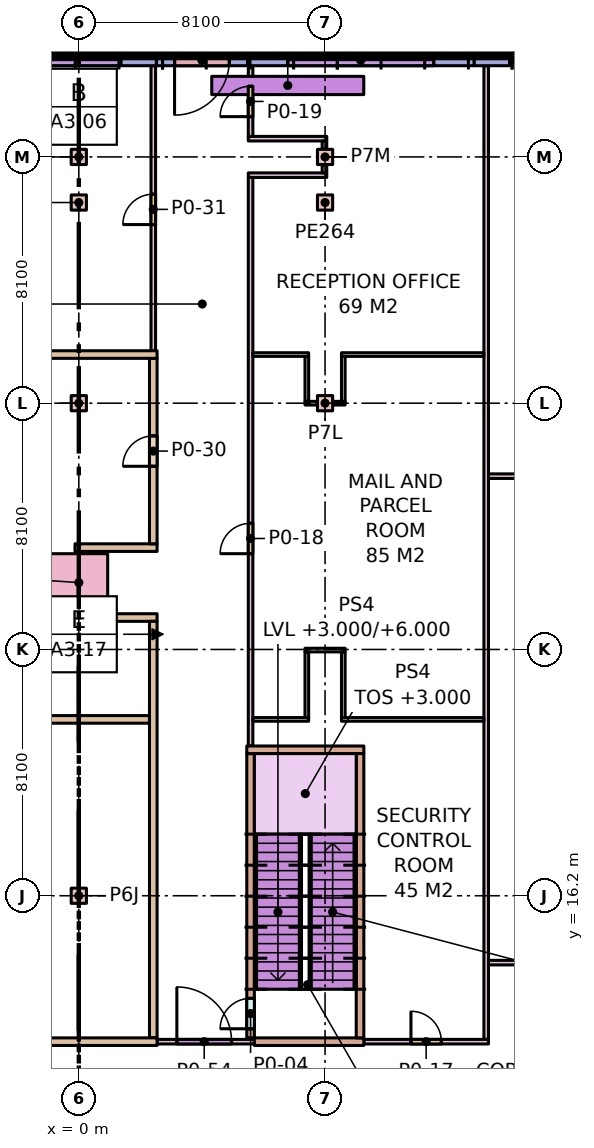
"""IFC4 building model, lengths in metres.
Left out: names, types, materials, properties, quantities, classifications, styles, units other than length and angle.
Written with IfcOpenShell. Run it as: python <this file> out.ifc"""

import sys

from ifc_helpers import new_model, si_unit, direction, frame, frame_2d, origin, origin_2d, place, context, subcontext, project, spatial, rectangle, extrude, element, fill, save


model = new_model("IFC4")
c1 = context("Model", 3, precision=1e-05, world=origin(), true_north=direction((0.0, 1.0)))
c2 = subcontext(c1, "Body", "Model", "MODEL_VIEW")
j1 = project(units=[si_unit("LENGTHUNIT", "METRE"), si_unit("PLANEANGLEUNIT", "RADIAN")], contexts=[c1])
p1 = place(None, origin())
s1 = spatial("IfcSite", under=j1, at=p1, CompositionType="ELEMENT")
p2 = place(p1, origin())
s2 = spatial("IfcBuilding", under=s1, at=p2, CompositionType="ELEMENT")
p3 = place(p2, origin())
s3 = spatial("IfcBuildingStorey", under=s2, at=p3, CompositionType="ELEMENT", Elevation=0.0)
for number, where, z_axis, x_axis in (
    (1, (0.0, 16.2, 0.0), (0.0, 0.0, 1.0), (1.0, 0.0, 0.0)),
    (2, (0.0, 32.4, 0.0), (0.0, 0.0, 1.0), (1.0, 0.0, 0.0)),
    (3, (0.0, 40.5, 0.0), (0.0, 0.0, 1.0), (1.0, 0.0, 0.0)),
    (4, (8.1, 32.4, 0.0), (0.0, 0.0, 1.0), (1.0, 0.0, 0.0)),
    (5, (8.1, 40.5, 0.0), (0.0, 0.0, 1.0), (1.0, 0.0, 0.0)),
    (6, (8.1, 39.0, 0.0), (0.0, 0.0, 1.0), (1.0, 0.0, 0.0)),
    (7, (0.0, 39.0, 0.0), (0.0, 0.0, 1.0), (1.0, 0.0, 0.0)),
):
    element("IfcColumn", number, at=place(p3, frame(where, z_axis=z_axis, x_axis=x_axis)), inside=s3, PredefinedType="COLUMN", context=c2, shape_type="SweptSolid", body=[
        extrude(rectangle(XDim=0.5, YDim=0.5, at=origin_2d()), origin(), (0.0, 0.0, 1.0), 6.0),
    ])
p4 = place(p3, frame((0.0, 26.5, 0.0), z_axis=(0.0, 0.0, 1.0), x_axis=(-1.0, 0.0, 0.0)))
e8 = element("IfcColumn", 8, at=p4, inside=s3, PredefinedType="COLUMN", context=c2, shape_type="SweptSolid", body=[
    extrude(rectangle(XDim=1.9, YDim=1.9, at=origin_2d()), origin(), (0.0, 0.0, 1.0), 6.0),
])
p5 = place(p3, frame((14.167, 43.675, 0.0), z_axis=(0.0, 0.0, 1.0), x_axis=(-1.0, 0.0, 0.0)))
e9 = element("IfcWall", 9, at=p5, inside=s3, PredefinedType="STANDARD", context=c2, shape_type="SweptSolid", body=[
    extrude(rectangle(XDim=1.167, YDim=0.35, at=frame_2d((0.583, 0.0))), origin(), (0.0, 0.0, 1.0), 5.68),
])
p6 = place(p3, frame((13.0, 43.675, 0.0), z_axis=(0.0, 0.0, 1.0), x_axis=(-1.0, 0.0, 0.0)))
e10 = element("IfcWall", 10, at=p6, inside=s3, PredefinedType="STANDARD", context=c2, shape_type="SweptSolid", body=[
    extrude(rectangle(XDim=7.45, YDim=0.35, at=frame_2d((3.725, 0.0))), origin(), (0.0, 0.0, 1.0), 5.68),
])
p7 = place(p6, frame((1.325, 0.0, 0.3)))
e11 = element("IfcOpeningElement", 11, at=p7, cuts=e10, PredefinedType="OPENING", context=c2, shape_type="SweptSolid", body=[
    extrude(rectangle(XDim=4.8, YDim=4.5, at=frame_2d((2.4, 2.25))), frame((0.0, 0.185, 0.0), z_axis=(0.0, -1.0, 0.0), x_axis=(1.0, 0.0, 0.0)), (0.0, 0.0, 1.0), 0.37),
])
p8 = place(p3, frame((5.55, 43.675, 0.0), z_axis=(0.0, 0.0, 1.0), x_axis=(-1.0, 0.0, 0.0)))
e12 = element("IfcWall", 12, at=p8, inside=s3, PredefinedType="STANDARD", context=c2, shape_type="SweptSolid", body=[
    extrude(rectangle(XDim=3.0, YDim=0.35, at=frame_2d((1.5, 0.0))), origin(), (0.0, 0.0, 1.0), 5.68),
])
p9 = place(p8, frame((0.6, 0.0, 0.0)))
e13 = element("IfcOpeningElement", 13, at=p9, cuts=e12, PredefinedType="OPENING", context=c2, shape_type="SweptSolid", body=[
    extrude(rectangle(XDim=1.8, YDim=2.4, at=frame_2d((0.9, 1.2))), frame((0.0, 0.185, 0.0), z_axis=(0.0, -1.0, 0.0), x_axis=(1.0, 0.0, 0.0)), (0.0, 0.0, 1.0), 0.37),
])
p10 = place(p3, frame((2.55, 43.675, 0.0), z_axis=(0.0, 0.0, 1.0), x_axis=(-1.0, 0.0, 0.0)))
e14 = element("IfcWall", 14, at=p10, inside=s3, PredefinedType="STANDARD", context=c2, shape_type="SweptSolid", body=[
    extrude(rectangle(XDim=7.134, YDim=0.35, at=frame_2d((3.567, 0.0))), origin(), (0.0, 0.0, 1.0), 5.68),
])
p11 = place(p10, frame((1.167, 0.0, 0.3)))
e15 = element("IfcOpeningElement", 15, at=p11, cuts=e14, PredefinedType="OPENING", context=c2, shape_type="SweptSolid", body=[
    extrude(rectangle(XDim=4.8, YDim=4.5, at=frame_2d((2.4, 2.25))), frame((0.0, 0.185, 0.0), z_axis=(0.0, -1.0, 0.0), x_axis=(1.0, 0.0, 0.0)), (0.0, 0.0, 1.0), 0.37),
])
p12 = place(p3, frame((9.373, 42.85, 6.0), z_axis=(0.0, 0.0, 1.0), x_axis=(-1.0, 0.0, 0.0)))
e16 = element("IfcWall", 16, at=p12, inside=s3, PredefinedType="PARAPET", context=c2, shape_type="SweptSolid", body=[
    extrude(rectangle(XDim=5.0, YDim=0.6, at=frame_2d((2.5, 0.0))), origin(), (0.0, 0.0, 1.0), 0.9),
])
p13 = place(p3, frame((-17.713, 22.0, 0.0), z_axis=(0.0, 0.0, 1.0), x_axis=(1.0, 0.0, 0.0)))
e17 = element("IfcWall", 17, at=p13, inside=s3, PredefinedType="PARTITIONING", context=c2, shape_type="SweptSolid", body=[
    extrude(rectangle(XDim=20.038, YDim=0.25, at=frame_2d((10.019, 0.0))), origin(), (0.0, 0.0, 1.0), 5.68),
])
for number, where, z_axis, x_axis in (
    (18, (-0.125, 25.35, 0.0), (0.0, 0.0, 1.0), (1.0, 0.0, 0.0)),
    (19, (-0.125, 27.65, 0.0), (0.0, 0.0, 1.0), (1.0, 0.0, 0.0)),
):
    element("IfcWall", number, at=place(p3, frame(where, z_axis=z_axis, x_axis=x_axis)), inside=s3, PredefinedType="PARTITIONING", context=c2, shape_type="SweptSolid", body=[
        extrude(rectangle(XDim=2.7, YDim=0.25, at=frame_2d((1.35, 0.0))), origin(), (0.0, 0.0, 1.0), 5.68),
    ])
p14 = place(p3, frame((2.45, 27.775, 0.0), z_axis=(0.0, 0.0, 1.0), x_axis=(0.0, 1.0, 0.0)))
e20 = element("IfcWall", 20, at=p14, inside=s3, PredefinedType="PARTITIONING", context=c2, shape_type="SweptSolid", body=[
    extrude(rectangle(XDim=6.1, YDim=0.25, at=frame_2d((3.05, 0.0))), origin(), (0.0, 0.0, 1.0), 5.68),
])
p15 = place(p14, frame((2.55, 0.0, 0.0)))
e21 = element("IfcOpeningElement", 21, at=p15, cuts=e20, PredefinedType="OPENING", context=c2, shape_type="SweptSolid", body=[
    extrude(rectangle(XDim=1.0, YDim=2.1, at=frame_2d((0.5, 1.05))), frame((0.0, 0.135, 0.0), z_axis=(0.0, -1.0, 0.0), x_axis=(1.0, 0.0, 0.0)), (0.0, 0.0, 1.0), 0.27),
])
p16 = place(p3, frame((-24.125, 34.0, 0.0), z_axis=(0.0, 0.0, 1.0), x_axis=(1.0, 0.0, 0.0)))
e22 = element("IfcWall", 22, at=p16, inside=s3, PredefinedType="PARTITIONING", context=c2, shape_type="SweptSolid", body=[
    extrude(rectangle(XDim=26.7, YDim=0.25, at=frame_2d((13.35, 0.0))), origin(), (0.0, 0.0, 1.0), 5.68),
])
p17 = place(p3, frame((2.45, 11.525, 0.0), z_axis=(0.0, 0.0, 1.0), x_axis=(0.0, 1.0, 0.0)))
e23 = element("IfcWall", 23, at=p17, inside=s3, PredefinedType="PARTITIONING", context=c2, shape_type="SweptSolid", body=[
    extrude(rectangle(XDim=13.7, YDim=0.25, at=frame_2d((6.85, 0.0))), origin(), (0.0, 0.0, 1.0), 5.68),
])
p18 = place(p3, frame((-13.275, 11.4, 0.0), z_axis=(0.0, 0.0, 1.0), x_axis=(1.0, 0.0, 0.0)))
e24 = element("IfcWall", 24, at=p18, inside=s3, PredefinedType="PARTITIONING", context=c2, shape_type="SweptSolid", body=[
    extrude(rectangle(XDim=15.85, YDim=0.25, at=frame_2d((7.925, 0.0))), origin(), (0.0, 0.0, 1.0), 5.68),
])
p19 = place(p18, frame((7.45, 0.0, 0.0)))
e25 = element("IfcOpeningElement", 25, at=p19, cuts=e24, PredefinedType="OPENING", context=c2, shape_type="SweptSolid", body=[
    extrude(rectangle(XDim=1.0, YDim=2.1, at=frame_2d((0.5, 1.05))), frame((0.0, 0.135, 0.0), z_axis=(0.0, -1.0, 0.0), x_axis=(1.0, 0.0, 0.0)), (0.0, 0.0, 1.0), 0.27),
])
p20 = place(p3, frame((13.475, 14.0, 0.0), z_axis=(0.0, 0.0, 1.0), x_axis=(1.0, 0.0, 0.0)))
e26 = element("IfcWall", 26, at=p20, inside=s3, PredefinedType="PARTITIONING", context=c2, shape_type="SweptSolid", body=[
    extrude(rectangle(XDim=38.6, YDim=0.15, at=frame_2d((19.3, 0.0))), origin(), (0.0, 0.0, 1.0), 5.68),
])
p21 = place(p20, frame((22.875, 0.0, 0.0)))
e27 = element("IfcOpeningElement", 27, at=p21, cuts=e26, PredefinedType="OPENING", context=c2, shape_type="SweptSolid", body=[
    extrude(rectangle(XDim=1.8, YDim=2.4, at=frame_2d((0.9, 1.2))), frame((0.0, 0.085, 0.0), z_axis=(0.0, -1.0, 0.0), x_axis=(1.0, 0.0, 0.0)), (0.0, 0.0, 1.0), 0.17),
])
p22 = place(p3, frame((13.475, 30.0, 0.0), z_axis=(0.0, 0.0, 1.0), x_axis=(1.0, 0.0, 0.0)))
e28 = element("IfcWall", 28, at=p22, inside=s3, PredefinedType="PARTITIONING", context=c2, shape_type="SweptSolid", body=[
    extrude(rectangle(XDim=38.6, YDim=0.15, at=frame_2d((19.3, 0.0))), origin(), (0.0, 0.0, 1.0), 5.68),
])
p23 = place(p22, frame((18.35, 0.0, 0.0)))
e29 = element("IfcOpeningElement", 29, at=p23, cuts=e28, PredefinedType="OPENING", context=c2, shape_type="SweptSolid", body=[
    extrude(rectangle(XDim=1.8, YDim=2.4, at=frame_2d((0.9, 1.2))), frame((0.0, 0.085, 0.0), z_axis=(0.0, -1.0, 0.0), x_axis=(1.0, 0.0, 0.0)), (0.0, 0.0, 1.0), 0.17),
])
p24 = place(p3, frame((13.4, 11.475, 0.0), z_axis=(0.0, 0.0, 1.0), x_axis=(0.0, 1.0, 0.0)))
e30 = element("IfcWall", 30, at=p24, inside=s3, PredefinedType="PARTITIONING", context=c2, shape_type="SweptSolid", body=[
    extrude(rectangle(XDim=32.025, YDim=0.15, at=frame_2d((16.012, 0.0))), origin(), (0.0, 0.0, 1.0), 5.68),
])
p25 = place(p3, frame((7.44, 32.4, 0.0), z_axis=(0.0, 0.0, 1.0), x_axis=(1.0, 0.0, 0.0)))
e31 = element("IfcWall", 31, at=p25, inside=s3, PredefinedType="PARTITIONING", context=c2, shape_type="SweptSolid", body=[
    extrude(rectangle(XDim=0.4, YDim=0.12, at=frame_2d((0.2, 0.0))), origin(), (0.0, 0.0, 1.0), 5.68),
])
p26 = place(p3, frame((8.36, 32.4, 0.0), z_axis=(0.0, 0.0, 1.0), x_axis=(1.0, 0.0, 0.0)))
e32 = element("IfcWall", 32, at=p26, inside=s3, PredefinedType="PARTITIONING", context=c2, shape_type="SweptSolid", body=[
    extrude(rectangle(XDim=0.4, YDim=0.12, at=frame_2d((0.2, 0.0))), origin(), (0.0, 0.0, 1.0), 5.68),
])
p27 = place(p3, frame((5.725, 34.0, 0.0), z_axis=(0.0, 0.0, 1.0), x_axis=(1.0, 0.0, 0.0)))
e33 = element("IfcWall", 33, at=p27, inside=s3, PredefinedType="PARTITIONING", context=c2, shape_type="SweptSolid", body=[
    extrude(rectangle(XDim=1.835, YDim=0.12, at=frame_2d((0.917, 0.0))), origin(), (0.0, 0.0, 1.0), 5.68),
])
p28 = place(p3, frame((8.64, 34.0, 0.0), z_axis=(0.0, 0.0, 1.0), x_axis=(1.0, 0.0, 0.0)))
e34 = element("IfcWall", 34, at=p28, inside=s3, PredefinedType="PARTITIONING", context=c2, shape_type="SweptSolid", body=[
    extrude(rectangle(XDim=4.685, YDim=0.12, at=frame_2d((2.343, 0.0))), origin(), (0.0, 0.0, 1.0), 5.68),
])
for number, where, z_axis, x_axis in (
    (35, (7.5, 32.46, 0.0), (0.0, 0.0, 1.0), (0.0, 1.0, 0.0)),
    (36, (8.7, 32.46, 0.0), (0.0, 0.0, 1.0), (0.0, 1.0, 0.0)),
):
    element("IfcWall", number, at=place(p3, frame(where, z_axis=z_axis, x_axis=x_axis)), inside=s3, PredefinedType="PARTITIONING", context=c2, shape_type="SweptSolid", body=[
        extrude(rectangle(XDim=1.48, YDim=0.12, at=frame_2d((0.74, 0.0))), origin(), (0.0, 0.0, 1.0), 5.68),
    ])
p29 = place(p3, frame((5.725, 22.0, 0.0), z_axis=(0.0, 0.0, 1.0), x_axis=(1.0, 0.0, 0.0)))
e37 = element("IfcWall", 37, at=p29, inside=s3, PredefinedType="PARTITIONING", context=c2, shape_type="SweptSolid", body=[
    extrude(rectangle(XDim=1.835, YDim=0.12, at=frame_2d((0.917, 0.0))), origin(), (0.0, 0.0, 1.0), 5.68),
])
p30 = place(p3, frame((8.64, 22.0, 0.0), z_axis=(0.0, 0.0, 1.0), x_axis=(1.0, 0.0, 0.0)))
e38 = element("IfcWall", 38, at=p30, inside=s3, PredefinedType="PARTITIONING", context=c2, shape_type="SweptSolid", body=[
    extrude(rectangle(XDim=4.685, YDim=0.12, at=frame_2d((2.343, 0.0))), origin(), (0.0, 0.0, 1.0), 5.68),
])
p31 = place(p3, frame((7.44, 24.28, 0.0), z_axis=(0.0, 0.0, 1.0), x_axis=(1.0, 0.0, 0.0)))
e39 = element("IfcWall", 39, at=p31, inside=s3, PredefinedType="PARTITIONING", context=c2, shape_type="SweptSolid", body=[
    extrude(rectangle(XDim=1.32, YDim=0.12, at=frame_2d((0.66, 0.0))), origin(), (0.0, 0.0, 1.0), 5.68),
])
for number, where, z_axis, x_axis in (
    (40, (7.5, 22.06, 0.0), (0.0, 0.0, 1.0), (0.0, 1.0, 0.0)),
    (41, (8.7, 22.06, 0.0), (0.0, 0.0, 1.0), (0.0, 1.0, 0.0)),
):
    element("IfcWall", number, at=place(p3, frame(where, z_axis=z_axis, x_axis=x_axis)), inside=s3, PredefinedType="PARTITIONING", context=c2, shape_type="SweptSolid", body=[
        extrude(rectangle(XDim=2.16, YDim=0.12, at=frame_2d((1.08, 0.0))), origin(), (0.0, 0.0, 1.0), 5.68),
    ])
p32 = place(p3, frame((5.65, 11.525, 0.0), z_axis=(0.0, 0.0, 1.0), x_axis=(0.0, 1.0, 0.0)))
e42 = element("IfcWall", 42, at=p32, inside=s3, PredefinedType="STANDARD", context=c2, shape_type="SweptSolid", body=[
    extrude(rectangle(XDim=9.35, YDim=0.25, at=frame_2d((4.675, 0.0))), origin(), (0.0, 0.0, 1.0), 5.68),
])
p33 = place(p32, frame((0.3, 0.0, 0.0)))
e43 = element("IfcOpeningElement", 43, at=p33, cuts=e42, PredefinedType="OPENING", context=c2, shape_type="SweptSolid", body=[
    extrude(rectangle(XDim=1.0, YDim=2.1, at=frame_2d((0.5, 1.05))), frame((0.0, 0.135, 0.0), z_axis=(0.0, -1.0, 0.0), x_axis=(1.0, 0.0, 0.0)), (0.0, 0.0, 1.0), 0.27),
])
for number, where, z_axis, x_axis in (
    (44, (5.575, 39.9, 0.0), (0.0, 0.0, 1.0), (1.0, 0.0, 0.0)),
    (45, (5.575, 41.1, 0.0), (0.0, 0.0, 1.0), (1.0, 0.0, 0.0)),
):
    element("IfcWall", number, at=place(p3, frame(where, z_axis=z_axis, x_axis=x_axis)), inside=s3, PredefinedType="PARTITIONING", context=c2, shape_type="SweptSolid", body=[
        extrude(rectangle(XDim=2.58, YDim=0.15, at=frame_2d((1.29, 0.0))), origin(), (0.0, 0.0, 1.0), 5.68),
    ])
p34 = place(p3, frame((5.65, 41.175, 0.0), z_axis=(0.0, 0.0, 1.0), x_axis=(0.0, 1.0, 0.0)))
e46 = element("IfcWall", 46, at=p34, inside=s3, PredefinedType="PARTITIONING", context=c2, shape_type="SweptSolid", body=[
    extrude(rectangle(XDim=2.325, YDim=0.15, at=frame_2d((1.163, 0.0))), origin(), (0.0, 0.0, 1.0), 5.68),
])
p35 = place(p34, frame((0.65, 0.0, 0.0)))
e47 = element("IfcOpeningElement", 47, at=p35, cuts=e46, PredefinedType="OPENING", context=c2, shape_type="SweptSolid", body=[
    extrude(rectangle(XDim=1.0, YDim=2.1, at=frame_2d((0.5, 1.05))), frame((0.0, 0.085, 0.0), z_axis=(0.0, -1.0, 0.0), x_axis=(1.0, 0.0, 0.0)), (0.0, 0.0, 1.0), 0.17),
])
for number, where, z_axis, x_axis in (
    (48, (8.08, 39.975, 0.0), (0.0, 0.0, 1.0), (0.0, 1.0, 0.0)),
    (49, (8.08, 40.76, 0.0), (0.0, 0.0, 1.0), (0.0, 1.0, 0.0)),
):
    element("IfcWall", number, at=place(p3, frame(where, z_axis=z_axis, x_axis=x_axis)), inside=s3, PredefinedType="PARTITIONING", context=c2, shape_type="SweptSolid", body=[
        extrude(rectangle(XDim=0.265, YDim=0.15, at=frame_2d((0.132, 0.0))), origin(), (0.0, 0.0, 1.0), 5.68),
    ])
p36 = place(p3, frame((2.575, 11.4, 0.0), z_axis=(0.0, 0.0, 1.0), x_axis=(1.0, 0.0, 0.0)))
e50 = element("IfcWall", 50, at=p36, inside=s3, PredefinedType="PARTITIONING", context=c2, shape_type="SweptSolid", body=[
    extrude(rectangle(XDim=3.2, YDim=0.15, at=frame_2d((1.6, 0.0))), origin(), (0.0, 0.0, 1.0), 5.68),
])
p37 = place(p36, frame((0.65, 0.0, 0.0)))
e51 = element("IfcOpeningElement", 51, at=p37, cuts=e50, PredefinedType="OPENING", context=c2, shape_type="SweptSolid", body=[
    extrude(rectangle(XDim=1.8, YDim=2.4, at=frame_2d((0.9, 1.2))), frame((0.0, 0.085, 0.0), z_axis=(0.0, -1.0, 0.0), x_axis=(1.0, 0.0, 0.0)), (0.0, 0.0, 1.0), 0.17),
])
p38 = place(p3, frame((5.65, 21.125, 0.0), z_axis=(0.0, 0.0, 1.0), x_axis=(0.0, 1.0, 0.0)))
e52 = element("IfcWall", 52, at=p38, inside=s3, PredefinedType="PARTITIONING", context=c2, shape_type="SweptSolid", body=[
    extrude(rectangle(XDim=18.7, YDim=0.15, at=frame_2d((9.35, 0.0))), origin(), (0.0, 0.0, 1.0), 5.68),
])
p39 = place(p38, frame((6.325, 0.0, 0.0)))
e53 = element("IfcOpeningElement", 53, at=p39, cuts=e52, PredefinedType="OPENING", context=c2, shape_type="SweptSolid", body=[
    extrude(rectangle(XDim=1.0, YDim=2.1, at=frame_2d((0.5, 1.05))), frame((0.0, 0.085, 0.0), z_axis=(0.0, -1.0, 0.0), x_axis=(1.0, 0.0, 0.0)), (0.0, 0.0, 1.0), 0.17),
])
p40 = place(p3, frame((2.45, 34.125, 0.0), z_axis=(0.0, 0.0, 1.0), x_axis=(0.0, 1.0, 0.0)))
e54 = element("IfcWall", 54, at=p40, inside=s3, PredefinedType="PARTITIONING", context=c2, shape_type="SweptSolid", body=[
    extrude(rectangle(XDim=9.375, YDim=0.15, at=frame_2d((4.688, 0.0))), origin(), (0.0, 0.0, 1.0), 5.68),
])
p41 = place(p40, frame((4.15, 0.0, 0.0)))
e55 = element("IfcOpeningElement", 55, at=p41, cuts=e54, PredefinedType="OPENING", context=c2, shape_type="SweptSolid", body=[
    extrude(rectangle(XDim=1.0, YDim=2.1, at=frame_2d((0.5, 1.05))), frame((0.0, 0.085, 0.0), z_axis=(0.0, -1.0, 0.0), x_axis=(1.0, 0.0, 0.0)), (0.0, 0.0, 1.0), 0.17),
])
p42 = place(p3, frame((5.775, 11.4, 0.0), z_axis=(0.0, 0.0, 1.0), x_axis=(1.0, 0.0, 0.0)))
e56 = element("IfcWall", 56, at=p42, inside=s3, PredefinedType="STANDARD", context=c2, shape_type="SweptSolid", body=[
    extrude(rectangle(XDim=3.6, YDim=0.25, at=frame_2d((1.8, 0.0))), origin(), (0.0, 0.0, 1.0), 5.68),
])
p43 = place(p3, frame((5.525, 21.0, 0.0), z_axis=(0.0, 0.0, 1.0), x_axis=(1.0, 0.0, 0.0)))
e57 = element("IfcWall", 57, at=p43, inside=s3, PredefinedType="STANDARD", context=c2, shape_type="SweptSolid", body=[
    extrude(rectangle(XDim=3.85, YDim=0.25, at=frame_2d((1.925, 0.0))), origin(), (0.0, 0.0, 1.0), 5.68),
])
p44 = place(p3, frame((9.25, 11.525, 0.0), z_axis=(0.0, 0.0, 1.0), x_axis=(0.0, 1.0, 0.0)))
e58 = element("IfcWall", 58, at=p44, inside=s3, PredefinedType="STANDARD", context=c2, shape_type="SweptSolid", body=[
    extrude(rectangle(XDim=9.35, YDim=0.25, at=frame_2d((4.675, 0.0))), origin(), (0.0, 0.0, 1.0), 5.68),
])
p45 = place(p3, frame((9.375, 11.4, 0.0), z_axis=(0.0, 0.0, 1.0), x_axis=(1.0, 0.0, 0.0)))
e59 = element("IfcWall", 59, at=p45, inside=s3, PredefinedType="PARTITIONING", context=c2, shape_type="SweptSolid", body=[
    extrude(rectangle(XDim=4.1, YDim=0.15, at=frame_2d((2.05, 0.0))), origin(), (0.0, 0.0, 1.0), 5.68),
])
p46 = place(p45, frame((1.55, 0.0, 0.0)))
e60 = element("IfcOpeningElement", 60, at=p46, cuts=e59, PredefinedType="OPENING", context=c2, shape_type="SweptSolid", body=[
    extrude(rectangle(XDim=1.0, YDim=2.1, at=frame_2d((0.5, 1.05))), frame((0.0, 0.085, 0.0), z_axis=(0.0, -1.0, 0.0), x_axis=(1.0, 0.0, 0.0)), (0.0, 0.0, 1.0), 0.17),
])
p47 = place(p7, origin())
e61 = element("IfcWindow", 61, at=p47, inside=s3, PartitioningType="SINGLE_PANEL", PredefinedType="WINDOW", context=c2, shape_type="SweptSolid", body=[
    extrude(rectangle(XDim=4.8, YDim=4.5, at=frame_2d((2.4, 2.25))), frame((0.0, 0.03, 0.0), z_axis=(0.0, -1.0, 0.0), x_axis=(1.0, 0.0, 0.0)), (0.0, 0.0, 1.0), 0.06),
])
fill(e11, e61)
p48 = place(p11, origin())
e62 = element("IfcWindow", 62, at=p48, inside=s3, PartitioningType="SINGLE_PANEL", PredefinedType="WINDOW", context=c2, shape_type="SweptSolid", body=[
    extrude(rectangle(XDim=4.8, YDim=4.5, at=frame_2d((2.4, 2.25))), frame((0.0, 0.03, 0.0), z_axis=(0.0, -1.0, 0.0), x_axis=(1.0, 0.0, 0.0)), (0.0, 0.0, 1.0), 0.06),
])
fill(e15, e62)
p49 = place(p33, origin())
e63 = element("IfcDoor", 63, at=p49, inside=s3, OperationType="SINGLE_SWING_LEFT", PredefinedType="DOOR", context=c2, shape_type="SweptSolid", body=[
    extrude(rectangle(XDim=1.0, YDim=2.1, at=frame_2d((0.5, 1.05))), frame((0.0, 0.025, 0.0), z_axis=(0.0, -1.0, 0.0), x_axis=(1.0, 0.0, 0.0)), (0.0, 0.0, 1.0), 0.05),
])
fill(e43, e63)
p50 = place(p46, origin())
e64 = element("IfcDoor", 64, at=p50, inside=s3, OperationType="SINGLE_SWING_LEFT", PredefinedType="DOOR", context=c2, shape_type="SweptSolid", body=[
    extrude(rectangle(XDim=1.0, YDim=2.1, at=frame_2d((0.5, 1.05))), frame((0.0, 0.025, 0.0), z_axis=(0.0, -1.0, 0.0), x_axis=(1.0, 0.0, 0.0)), (0.0, 0.0, 1.0), 0.05),
])
fill(e60, e64)
p51 = place(p39, origin())
e65 = element("IfcDoor", 65, at=p51, inside=s3, OperationType="SINGLE_SWING_LEFT", PredefinedType="DOOR", context=c2, shape_type="SweptSolid", body=[
    extrude(rectangle(XDim=1.0, YDim=2.1, at=frame_2d((0.5, 1.05))), frame((0.0, 0.025, 0.0), z_axis=(0.0, -1.0, 0.0), x_axis=(1.0, 0.0, 0.0)), (0.0, 0.0, 1.0), 0.05),
])
fill(e53, e65)
p52 = place(p35, origin())
e66 = element("IfcDoor", 66, at=p52, inside=s3, OperationType="SINGLE_SWING_LEFT", PredefinedType="DOOR", context=c2, shape_type="SweptSolid", body=[
    extrude(rectangle(XDim=1.0, YDim=2.1, at=frame_2d((0.5, 1.05))), frame((0.0, 0.025, 0.0), z_axis=(0.0, -1.0, 0.0), x_axis=(1.0, 0.0, 0.0)), (0.0, 0.0, 1.0), 0.05),
])
fill(e47, e66)
p53 = place(p15, origin())
e67 = element("IfcDoor", 67, at=p53, inside=s3, OperationType="SINGLE_SWING_LEFT", PredefinedType="DOOR", context=c2, shape_type="SweptSolid", body=[
    extrude(rectangle(XDim=1.0, YDim=2.1, at=frame_2d((0.5, 1.05))), frame((0.0, 0.025, 0.0), z_axis=(0.0, -1.0, 0.0), x_axis=(1.0, 0.0, 0.0)), (0.0, 0.0, 1.0), 0.05),
])
fill(e21, e67)
p54 = place(p41, origin())
e68 = element("IfcDoor", 68, at=p54, inside=s3, OperationType="SINGLE_SWING_LEFT", PredefinedType="DOOR", context=c2, shape_type="SweptSolid", body=[
    extrude(rectangle(XDim=1.0, YDim=2.1, at=frame_2d((0.5, 1.05))), frame((0.0, 0.025, 0.0), z_axis=(0.0, -1.0, 0.0), x_axis=(1.0, 0.0, 0.0)), (0.0, 0.0, 1.0), 0.05),
])
fill(e55, e68)
p55 = place(p9, frame((1.8, 0.0, 0.0), z_axis=(0.0, 0.0, 1.0), x_axis=(-1.0, 0.0, 0.0)))
e69 = element("IfcDoor", 69, at=p55, inside=s3, OperationType="SINGLE_SWING_RIGHT", PredefinedType="DOOR", context=c2, shape_type="SweptSolid", body=[
    extrude(rectangle(XDim=1.8, YDim=2.4, at=frame_2d((0.9, 1.2))), frame((0.0, 0.025, 0.0), z_axis=(0.0, -1.0, 0.0), x_axis=(1.0, 0.0, 0.0)), (0.0, 0.0, 1.0), 0.05),
])
fill(e13, e69)
p56 = place(p37, origin())
e70 = element("IfcDoor", 70, at=p56, inside=s3, OperationType="SINGLE_SWING_LEFT", PredefinedType="DOOR", context=c2, shape_type="SweptSolid", body=[
    extrude(rectangle(XDim=1.8, YDim=2.4, at=frame_2d((0.9, 1.2))), frame((0.0, 0.025, 0.0), z_axis=(0.0, -1.0, 0.0), x_axis=(1.0, 0.0, 0.0)), (0.0, 0.0, 1.0), 0.05),
])
fill(e51, e70)
save(model, sys.argv[1])
